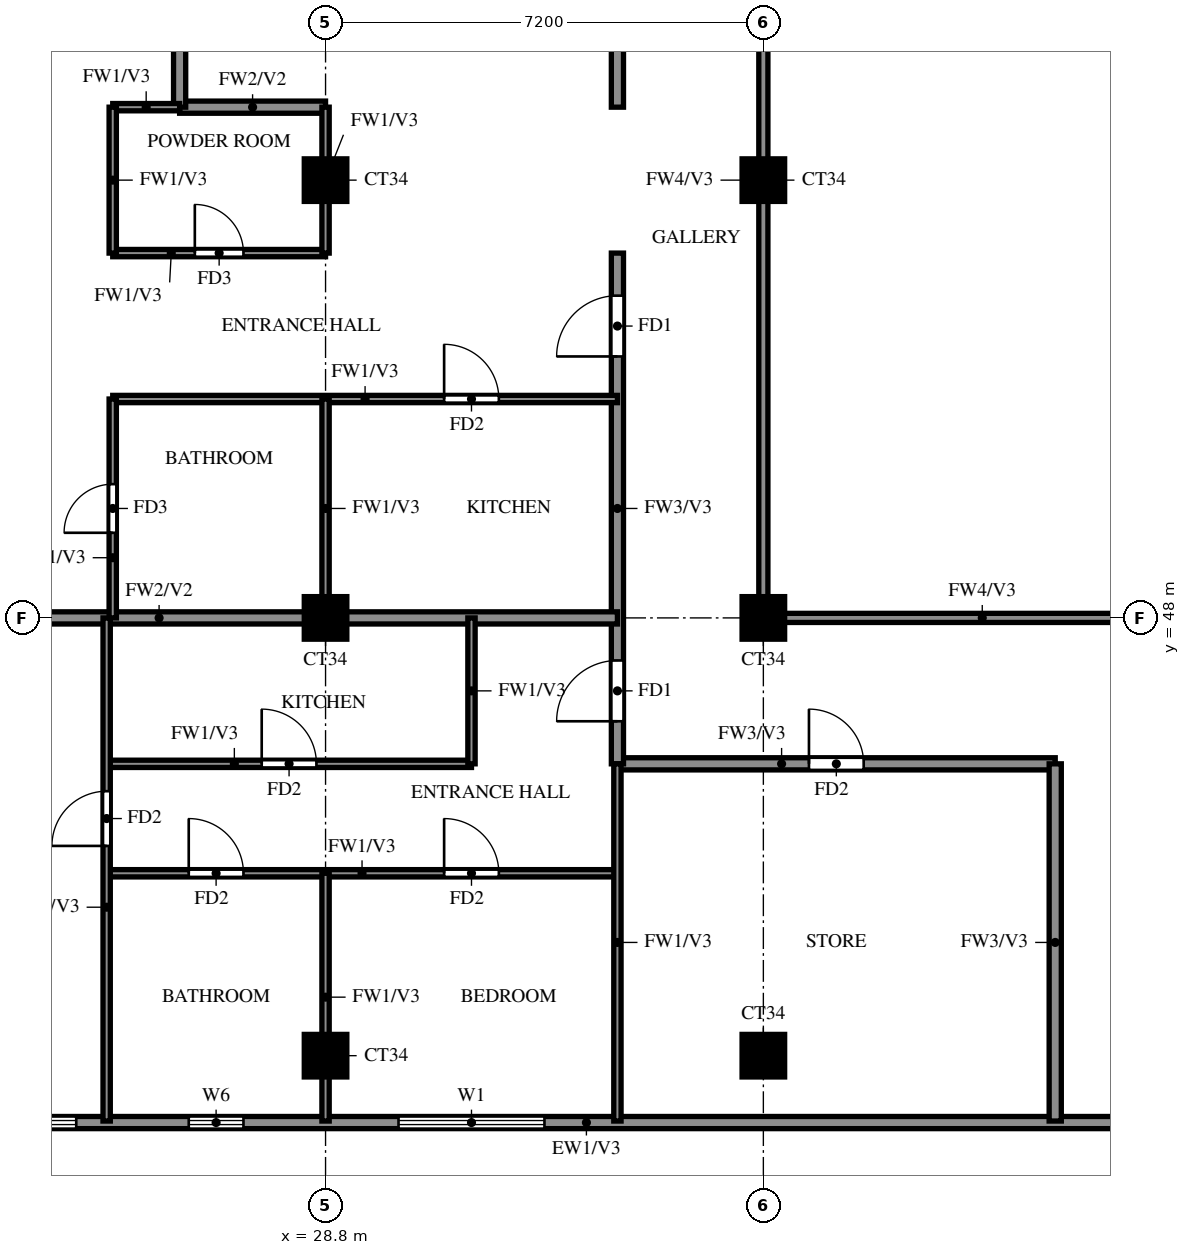
"""IFC4 building model, lengths in metres.
Left out: names, types, materials, properties, quantities, classifications, styles, units other than length and angle.
Written with IfcOpenShell. Run it as: python <this file> out.ifc"""

import sys

from ifc_helpers import new_model, si_unit, direction, frame, frame_2d, origin, origin_2d, place, context, subcontext, project, spatial, rectangle, extrude, source, transform, mapped, element, fill, save


model = new_model("IFC4")
c1 = context("Model", 3, precision=1e-05, world=origin(), true_north=direction((0.0, 1.0)))
c2 = subcontext(c1, "Body", "Model", "MODEL_VIEW")
j1 = project(units=[si_unit("LENGTHUNIT", "METRE"), si_unit("PLANEANGLEUNIT", "RADIAN")], contexts=[c1])
p1 = place(None, origin())
s1 = spatial("IfcSite", under=j1, at=p1, CompositionType="ELEMENT")
p2 = place(p1, origin())
s2 = spatial("IfcBuilding", under=s1, at=p2, CompositionType="ELEMENT")
p3 = place(p2, frame((0.0, 0.0, 260.5)))
s3 = spatial("IfcBuildingStorey", under=s2, at=p3, CompositionType="ELEMENT", Elevation=260.5)
m1 = source(origin(), c2, "Body", "SweptSolid", [
    extrude(rectangle(XDim=0.7, YDim=0.7, at=origin_2d()), origin(), (0.0, 0.0, 1.0), 3.22),
])
for number, where, z_axis, x_axis in (
    (1, (28.8, 40.8, 0.0), (0.0, 0.0, 1.0), (1.0, 0.0, 0.0)),
    (2, (36.0, 40.8, 0.0), (0.0, 0.0, 1.0), (1.0, 0.0, 0.0)),
    (3, (28.8, 48.0, 0.0), (0.0, 0.0, 1.0), (1.0, 0.0, 0.0)),
    (4, (36.0, 48.0, 0.0), (0.0, 0.0, 1.0), (1.0, 0.0, 0.0)),
    (5, (28.8, 55.2, 0.0), (0.0, 0.0, 1.0), (1.0, 0.0, 0.0)),
    (6, (36.0, 55.2, 0.0), (0.0, 0.0, 1.0), (1.0, 0.0, 0.0)),
):
    element("IfcColumn", number, at=place(p3, frame(where, z_axis=z_axis, x_axis=x_axis)), inside=s3, PredefinedType="COLUMN", context=c2, shape_type="MappedRepresentation", body=[
        mapped(m1, transform((0.0, 0.0, 0.0))),
    ])
p4 = place(p3, frame((22.2, 39.7, 0.0), z_axis=(0.0, 0.0, 1.0), x_axis=(1.0, 0.0, 0.0)))
e7 = element("IfcWall", 7, at=p4, inside=s3, PredefinedType="SOLIDWALL", context=c2, shape_type="SweptSolid", body=[
    extrude(rectangle(XDim=19.8, YDim=0.2, at=frame_2d((9.9, 0.0))), origin(), (0.0, 0.0, 1.0), 3.22),
])
p5 = place(p4, frame((0.7, 0.0, 0.6)))
e8 = element("IfcOpeningElement", 8, at=p5, cuts=e7, PredefinedType="OPENING", context=c2, shape_type="SweptSolid", body=[
    extrude(rectangle(XDim=1.8, YDim=2.4, at=frame_2d((0.9, 1.2))), frame((0.0, 0.11, 0.0), z_axis=(0.0, -1.0, 0.0), x_axis=(1.0, 0.0, 0.0)), (0.0, 0.0, 1.0), 0.22),
])
p6 = place(p4, frame((4.35, 0.0, 1.5)))
e9 = element("IfcOpeningElement", 9, at=p6, cuts=e7, PredefinedType="OPENING", context=c2, shape_type="SweptSolid", body=[
    extrude(rectangle(XDim=0.9, YDim=0.9, at=frame_2d((0.45, 0.45))), frame((0.0, 0.11, 0.0), z_axis=(0.0, -1.0, 0.0), x_axis=(1.0, 0.0, 0.0)), (0.0, 0.0, 1.0), 0.22),
])
p7 = place(p4, frame((7.8, 0.0, 0.6)))
e10 = element("IfcOpeningElement", 10, at=p7, cuts=e7, PredefinedType="OPENING", context=c2, shape_type="SweptSolid", body=[
    extrude(rectangle(XDim=2.4, YDim=2.4, at=frame_2d((1.2, 1.2))), frame((0.0, 0.11, 0.0), z_axis=(0.0, -1.0, 0.0), x_axis=(1.0, 0.0, 0.0)), (0.0, 0.0, 1.0), 0.22),
])
p8 = place(p3, frame((33.6, 45.6, 0.0), z_axis=(0.0, 0.0, 1.0), x_axis=(1.0, 0.0, 0.0)))
e11 = element("IfcWall", 11, at=p8, inside=s3, PredefinedType="SOLIDWALL", context=c2, shape_type="SweptSolid", body=[
    extrude(rectangle(XDim=7.2, YDim=0.2, at=frame_2d((3.6, 0.0))), origin(), (0.0, 0.0, 1.0), 3.22),
])
p9 = place(p8, frame((3.15, 0.0, 0.0)))
e12 = element("IfcOpeningElement", 12, at=p9, cuts=e11, PredefinedType="OPENING", context=c2, shape_type="SweptSolid", body=[
    extrude(rectangle(XDim=0.9, YDim=2.1, at=frame_2d((0.45, 1.05))), frame((0.0, 0.11, 0.0), z_axis=(0.0, -1.0, 0.0), x_axis=(1.0, 0.0, 0.0)), (0.0, 0.0, 1.0), 0.22),
])
p10 = place(p3, frame((33.6, 45.6, 0.0), z_axis=(0.0, 0.0, 1.0), x_axis=(0.0, 1.0, 0.0)))
e13 = element("IfcWall", 13, at=p10, inside=s3, PredefinedType="SOLIDWALL", context=c2, shape_type="SweptSolid", body=[
    extrude(rectangle(XDim=8.4, YDim=0.2, at=frame_2d((4.2, 0.0))), origin(), (0.0, 0.0, 1.0), 3.22),
])
p11 = place(p10, frame((0.7, 0.0, 0.0)))
e14 = element("IfcOpeningElement", 14, at=p11, cuts=e13, PredefinedType="OPENING", context=c2, shape_type="SweptSolid", body=[
    extrude(rectangle(XDim=1.0, YDim=2.1, at=frame_2d((0.5, 1.05))), frame((0.0, 0.11, 0.0), z_axis=(0.0, -1.0, 0.0), x_axis=(1.0, 0.0, 0.0)), (0.0, 0.0, 1.0), 0.22),
])
p12 = place(p10, frame((6.7, 0.0, 0.0)))
e15 = element("IfcOpeningElement", 15, at=p12, cuts=e13, PredefinedType="OPENING", context=c2, shape_type="SweptSolid", body=[
    extrude(rectangle(XDim=1.0, YDim=2.1, at=frame_2d((0.5, 1.05))), frame((0.0, 0.11, 0.0), z_axis=(0.0, -1.0, 0.0), x_axis=(1.0, 0.0, 0.0)), (0.0, 0.0, 1.0), 0.22),
])
p13 = place(p3, frame((33.6, 56.4, 0.0), z_axis=(0.0, 0.0, 1.0), x_axis=(0.0, 1.0, 0.0)))
e16 = element("IfcWall", 16, at=p13, inside=s3, PredefinedType="SOLIDWALL", context=c2, shape_type="SweptSolid", body=[
    extrude(rectangle(XDim=6.0, YDim=0.2, at=frame_2d((3.0, 0.0))), origin(), (0.0, 0.0, 1.0), 3.22),
])
p14 = place(p13, frame((3.7, 0.0, 0.0)))
e17 = element("IfcOpeningElement", 17, at=p14, cuts=e16, PredefinedType="OPENING", context=c2, shape_type="SweptSolid", body=[
    extrude(rectangle(XDim=1.0, YDim=2.1, at=frame_2d((0.5, 1.05))), frame((0.0, 0.11, 0.0), z_axis=(0.0, -1.0, 0.0), x_axis=(1.0, 0.0, 0.0)), (0.0, 0.0, 1.0), 0.22),
])
p15 = place(p3, frame((40.8, 39.725, 0.0), z_axis=(0.0, 0.0, 1.0), x_axis=(0.0, 1.0, 0.0)))
e18 = element("IfcWall", 18, at=p15, inside=s3, PredefinedType="SOLIDWALL", context=c2, shape_type="SweptSolid", body=[
    extrude(rectangle(XDim=5.875, YDim=0.2, at=frame_2d((2.938, 0.0))), origin(), (0.0, 0.0, 1.0), 3.22),
])
p16 = place(p3, frame((18.525, 48.0, 0.0), z_axis=(0.0, 0.0, 1.0), x_axis=(1.0, 0.0, 0.0)))
e19 = element("IfcWall", 19, at=p16, inside=s3, PredefinedType="SOLIDWALL", context=c2, shape_type="SweptSolid", body=[
    extrude(rectangle(XDim=15.075, YDim=0.2, at=frame_2d((7.538, 0.0))), origin(), (0.0, 0.0, 1.0), 3.22),
])
for number, where, z_axis, x_axis in (
    (20, (26.4, 56.4, 0.0), (0.0, 0.0, 1.0), (1.0, 0.0, 0.0)),
    (21, (26.4, 56.4, 0.0), (0.0, 0.0, 1.0), (0.0, 1.0, 0.0)),
):
    element("IfcWall", number, at=place(p3, frame(where, z_axis=z_axis, x_axis=x_axis)), inside=s3, PredefinedType="SOLIDWALL", context=c2, shape_type="SweptSolid", body=[
        extrude(rectangle(XDim=2.4, YDim=0.2, at=frame_2d((1.2, 0.0))), origin(), (0.0, 0.0, 1.0), 3.22),
    ])
p17 = place(p3, frame((25.2, 43.8, 0.0), z_axis=(0.0, 0.0, 1.0), x_axis=(1.0, 0.0, 0.0)))
e22 = element("IfcWall", 22, at=p17, inside=s3, PredefinedType="PARTITIONING", context=c2, shape_type="SweptSolid", body=[
    extrude(rectangle(XDim=8.4, YDim=0.12, at=frame_2d((4.2, 0.0))), origin(), (0.0, 0.0, 1.0), 3.22),
])
p18 = place(p17, frame((1.35, 0.0, 0.0)))
e23 = element("IfcOpeningElement", 23, at=p18, cuts=e22, PredefinedType="OPENING", context=c2, shape_type="SweptSolid", body=[
    extrude(rectangle(XDim=0.9, YDim=2.1, at=frame_2d((0.45, 1.05))), frame((0.0, 0.07, 0.0), z_axis=(0.0, -1.0, 0.0), x_axis=(1.0, 0.0, 0.0)), (0.0, 0.0, 1.0), 0.14),
])
p19 = place(p17, frame((5.55, 0.0, 0.0)))
e24 = element("IfcOpeningElement", 24, at=p19, cuts=e22, PredefinedType="OPENING", context=c2, shape_type="SweptSolid", body=[
    extrude(rectangle(XDim=0.9, YDim=2.1, at=frame_2d((0.45, 1.05))), frame((0.0, 0.07, 0.0), z_axis=(0.0, -1.0, 0.0), x_axis=(1.0, 0.0, 0.0)), (0.0, 0.0, 1.0), 0.14),
])
p20 = place(p3, frame((25.2, 45.6, 0.0), z_axis=(0.0, 0.0, 1.0), x_axis=(1.0, 0.0, 0.0)))
e25 = element("IfcWall", 25, at=p20, inside=s3, PredefinedType="PARTITIONING", context=c2, shape_type="SweptSolid", body=[
    extrude(rectangle(XDim=6.0, YDim=0.12, at=frame_2d((3.0, 0.0))), origin(), (0.0, 0.0, 1.0), 3.22),
])
p21 = place(p20, frame((2.55, 0.0, 0.0)))
e26 = element("IfcOpeningElement", 26, at=p21, cuts=e25, PredefinedType="OPENING", context=c2, shape_type="SweptSolid", body=[
    extrude(rectangle(XDim=0.9, YDim=2.1, at=frame_2d((0.45, 1.05))), frame((0.0, 0.07, 0.0), z_axis=(0.0, -1.0, 0.0), x_axis=(1.0, 0.0, 0.0)), (0.0, 0.0, 1.0), 0.14),
])
p22 = place(p3, frame((25.3, 51.6, 0.0), z_axis=(0.0, 0.0, 1.0), x_axis=(1.0, 0.0, 0.0)))
e27 = element("IfcWall", 27, at=p22, inside=s3, PredefinedType="PARTITIONING", context=c2, shape_type="SweptSolid", body=[
    extrude(rectangle(XDim=8.3, YDim=0.12, at=frame_2d((4.15, 0.0))), origin(), (0.0, 0.0, 1.0), 3.22),
])
p23 = place(p22, frame((5.45, 0.0, 0.0)))
e28 = element("IfcOpeningElement", 28, at=p23, cuts=e27, PredefinedType="OPENING", context=c2, shape_type="SweptSolid", body=[
    extrude(rectangle(XDim=0.9, YDim=2.1, at=frame_2d((0.45, 1.05))), frame((0.0, 0.07, 0.0), z_axis=(0.0, -1.0, 0.0), x_axis=(1.0, 0.0, 0.0)), (0.0, 0.0, 1.0), 0.14),
])
p24 = place(p3, frame((25.3, 54.0, 0.0), z_axis=(0.0, 0.0, 1.0), x_axis=(1.0, 0.0, 0.0)))
e29 = element("IfcWall", 29, at=p24, inside=s3, PredefinedType="PARTITIONING", context=c2, shape_type="SweptSolid", body=[
    extrude(rectangle(XDim=3.5, YDim=0.12, at=frame_2d((1.75, 0.0))), origin(), (0.0, 0.0, 1.0), 3.22),
])
p25 = place(p24, frame((1.35, 0.0, 0.0)))
e30 = element("IfcOpeningElement", 30, at=p25, cuts=e29, PredefinedType="OPENING", context=c2, shape_type="SweptSolid", body=[
    extrude(rectangle(XDim=0.8, YDim=2.1, at=frame_2d((0.4, 1.05))), frame((0.0, 0.07, 0.0), z_axis=(0.0, -1.0, 0.0), x_axis=(1.0, 0.0, 0.0)), (0.0, 0.0, 1.0), 0.14),
])
p26 = place(p3, frame((25.3, 56.4, 0.0), z_axis=(0.0, 0.0, 1.0), x_axis=(1.0, 0.0, 0.0)))
e31 = element("IfcWall", 31, at=p26, inside=s3, PredefinedType="PARTITIONING", context=c2, shape_type="SweptSolid", body=[
    extrude(rectangle(XDim=1.1, YDim=0.12, at=frame_2d((0.55, 0.0))), origin(), (0.0, 0.0, 1.0), 3.22),
])
p27 = place(p3, frame((25.2, 39.725, 0.0), z_axis=(0.0, 0.0, 1.0), x_axis=(0.0, 1.0, 0.0)))
e32 = element("IfcWall", 32, at=p27, inside=s3, PredefinedType="PARTITIONING", context=c2, shape_type="SweptSolid", body=[
    extrude(rectangle(XDim=8.275, YDim=0.12, at=frame_2d((4.137, 0.0))), origin(), (0.0, 0.0, 1.0), 3.22),
])
p28 = place(p27, frame((4.525, 0.0, 0.0)))
e33 = element("IfcOpeningElement", 33, at=p28, cuts=e32, PredefinedType="OPENING", context=c2, shape_type="SweptSolid", body=[
    extrude(rectangle(XDim=0.9, YDim=2.1, at=frame_2d((0.45, 1.05))), frame((0.0, 0.07, 0.0), z_axis=(0.0, -1.0, 0.0), x_axis=(1.0, 0.0, 0.0)), (0.0, 0.0, 1.0), 0.14),
])
p29 = place(p3, frame((25.3, 48.0, 0.0), z_axis=(0.0, 0.0, 1.0), x_axis=(0.0, 1.0, 0.0)))
e34 = element("IfcWall", 34, at=p29, inside=s3, PredefinedType="PARTITIONING", context=c2, shape_type="SweptSolid", body=[
    extrude(rectangle(XDim=3.6, YDim=0.12, at=frame_2d((1.8, 0.0))), origin(), (0.0, 0.0, 1.0), 3.22),
])
p30 = place(p29, frame((1.4, 0.0, 0.0)))
e35 = element("IfcOpeningElement", 35, at=p30, cuts=e34, PredefinedType="OPENING", context=c2, shape_type="SweptSolid", body=[
    extrude(rectangle(XDim=0.8, YDim=2.1, at=frame_2d((0.4, 1.05))), frame((0.0, 0.07, 0.0), z_axis=(0.0, -1.0, 0.0), x_axis=(1.0, 0.0, 0.0)), (0.0, 0.0, 1.0), 0.14),
])
p31 = place(p3, frame((25.3, 54.0, 0.0), z_axis=(0.0, 0.0, 1.0), x_axis=(0.0, 1.0, 0.0)))
e36 = element("IfcWall", 36, at=p31, inside=s3, PredefinedType="PARTITIONING", context=c2, shape_type="SweptSolid", body=[
    extrude(rectangle(XDim=2.4, YDim=0.12, at=frame_2d((1.2, 0.0))), origin(), (0.0, 0.0, 1.0), 3.22),
])
p32 = place(p3, frame((28.8, 39.725, 0.0), z_axis=(0.0, 0.0, 1.0), x_axis=(0.0, 1.0, 0.0)))
e37 = element("IfcWall", 37, at=p32, inside=s3, PredefinedType="PARTITIONING", context=c2, shape_type="SweptSolid", body=[
    extrude(rectangle(XDim=4.075, YDim=0.12, at=frame_2d((2.038, 0.0))), origin(), (0.0, 0.0, 1.0), 3.22),
])
p33 = place(p3, frame((28.8, 48.0, 0.0), z_axis=(0.0, 0.0, 1.0), x_axis=(0.0, 1.0, 0.0)))
e38 = element("IfcWall", 38, at=p33, inside=s3, PredefinedType="PARTITIONING", context=c2, shape_type="SweptSolid", body=[
    extrude(rectangle(XDim=3.6, YDim=0.12, at=frame_2d((1.8, 0.0))), origin(), (0.0, 0.0, 1.0), 3.22),
])
for number, where, z_axis, x_axis in (
    (39, (28.8, 54.0, 0.0), (0.0, 0.0, 1.0), (0.0, 1.0, 0.0)),
    (40, (31.2, 45.6, 0.0), (0.0, 0.0, 1.0), (0.0, 1.0, 0.0)),
):
    element("IfcWall", number, at=place(p3, frame(where, z_axis=z_axis, x_axis=x_axis)), inside=s3, PredefinedType="PARTITIONING", context=c2, shape_type="SweptSolid", body=[
        extrude(rectangle(XDim=2.4, YDim=0.12, at=frame_2d((1.2, 0.0))), origin(), (0.0, 0.0, 1.0), 3.22),
    ])
p34 = place(p3, frame((33.6, 39.725, 0.0), z_axis=(0.0, 0.0, 1.0), x_axis=(0.0, 1.0, 0.0)))
e41 = element("IfcWall", 41, at=p34, inside=s3, PredefinedType="PARTITIONING", context=c2, shape_type="SweptSolid", body=[
    extrude(rectangle(XDim=5.875, YDim=0.12, at=frame_2d((2.938, 0.0))), origin(), (0.0, 0.0, 1.0), 3.22),
])
p35 = place(p3, frame((36.0, 48.0, 0.0), z_axis=(0.0, 0.0, 1.0), x_axis=(1.0, 0.0, 0.0)))
e42 = element("IfcWall", 42, at=p35, inside=s3, PredefinedType="SOLIDWALL", context=c2, shape_type="SweptSolid", body=[
    extrude(rectangle(XDim=7.2, YDim=0.15, at=frame_2d((3.6, 0.0))), origin(), (0.0, 0.0, 1.0), 2.32),
])
p36 = place(p3, frame((36.0, 48.0, 0.0), z_axis=(0.0, 0.0, 1.0), x_axis=(0.0, 1.0, 0.0)))
e43 = element("IfcWall", 43, at=p36, inside=s3, PredefinedType="SOLIDWALL", context=c2, shape_type="SweptSolid", body=[
    extrude(rectangle(XDim=14.4, YDim=0.15, at=frame_2d((7.2, 0.0))), origin(), (0.0, 0.0, 1.0), 2.32),
])
p37 = place(p5, origin())
e44 = element("IfcWindow", 44, at=p37, inside=s3, PartitioningType="DOUBLE_PANEL_VERTICAL", PredefinedType="WINDOW", context=c2, shape_type="SweptSolid", body=[
    extrude(rectangle(XDim=1.8, YDim=2.4, at=frame_2d((0.9, 1.2))), frame((0.0, 0.03, 0.0), z_axis=(0.0, -1.0, 0.0), x_axis=(1.0, 0.0, 0.0)), (0.0, 0.0, 1.0), 0.06),
])
fill(e8, e44)
p38 = place(p6, origin())
e45 = element("IfcWindow", 45, at=p38, inside=s3, PartitioningType="SINGLE_PANEL", PredefinedType="WINDOW", context=c2, shape_type="SweptSolid", body=[
    extrude(rectangle(XDim=0.9, YDim=0.9, at=frame_2d((0.45, 0.45))), frame((0.0, 0.03, 0.0), z_axis=(0.0, -1.0, 0.0), x_axis=(1.0, 0.0, 0.0)), (0.0, 0.0, 1.0), 0.06),
])
fill(e9, e45)
p39 = place(p7, origin())
e46 = element("IfcWindow", 46, at=p39, inside=s3, PartitioningType="DOUBLE_PANEL_VERTICAL", PredefinedType="WINDOW", context=c2, shape_type="SweptSolid", body=[
    extrude(rectangle(XDim=2.4, YDim=2.4, at=frame_2d((1.2, 1.2))), frame((0.0, 0.03, 0.0), z_axis=(0.0, -1.0, 0.0), x_axis=(1.0, 0.0, 0.0)), (0.0, 0.0, 1.0), 0.06),
])
fill(e10, e46)
p40 = place(p11, origin())
e47 = element("IfcDoor", 47, at=p40, inside=s3, OperationType="SINGLE_SWING_LEFT", PredefinedType="DOOR", context=c2, shape_type="SweptSolid", body=[
    extrude(rectangle(XDim=1.0, YDim=2.1, at=frame_2d((0.5, 1.05))), frame((0.0, 0.025, 0.0), z_axis=(0.0, -1.0, 0.0), x_axis=(1.0, 0.0, 0.0)), (0.0, 0.0, 1.0), 0.05),
])
fill(e14, e47)
p41 = place(p28, origin())
e48 = element("IfcDoor", 48, at=p41, inside=s3, OperationType="SINGLE_SWING_LEFT", PredefinedType="DOOR", context=c2, shape_type="SweptSolid", body=[
    extrude(rectangle(XDim=0.9, YDim=2.1, at=frame_2d((0.45, 1.05))), frame((0.0, 0.025, 0.0), z_axis=(0.0, -1.0, 0.0), x_axis=(1.0, 0.0, 0.0)), (0.0, 0.0, 1.0), 0.05),
])
fill(e33, e48)
p42 = place(p18, origin())
e49 = element("IfcDoor", 49, at=p42, inside=s3, OperationType="SINGLE_SWING_RIGHT", PredefinedType="DOOR", context=c2, shape_type="SweptSolid", body=[
    extrude(rectangle(XDim=0.9, YDim=2.1, at=frame_2d((0.45, 1.05))), frame((0.0, 0.025, 0.0), z_axis=(0.0, -1.0, 0.0), x_axis=(1.0, 0.0, 0.0)), (0.0, 0.0, 1.0), 0.05),
])
fill(e23, e49)
p43 = place(p19, origin())
e50 = element("IfcDoor", 50, at=p43, inside=s3, OperationType="SINGLE_SWING_LEFT", PredefinedType="DOOR", context=c2, shape_type="SweptSolid", body=[
    extrude(rectangle(XDim=0.9, YDim=2.1, at=frame_2d((0.45, 1.05))), frame((0.0, 0.025, 0.0), z_axis=(0.0, -1.0, 0.0), x_axis=(1.0, 0.0, 0.0)), (0.0, 0.0, 1.0), 0.05),
])
fill(e24, e50)
p44 = place(p21, origin())
e51 = element("IfcDoor", 51, at=p44, inside=s3, OperationType="SINGLE_SWING_LEFT", PredefinedType="DOOR", context=c2, shape_type="SweptSolid", body=[
    extrude(rectangle(XDim=0.9, YDim=2.1, at=frame_2d((0.45, 1.05))), frame((0.0, 0.025, 0.0), z_axis=(0.0, -1.0, 0.0), x_axis=(1.0, 0.0, 0.0)), (0.0, 0.0, 1.0), 0.05),
])
fill(e26, e51)
p45 = place(p9, origin())
e52 = element("IfcDoor", 52, at=p45, inside=s3, OperationType="SINGLE_SWING_RIGHT", PredefinedType="DOOR", context=c2, shape_type="SweptSolid", body=[
    extrude(rectangle(XDim=0.9, YDim=2.1, at=frame_2d((0.45, 1.05))), frame((0.0, 0.025, 0.0), z_axis=(0.0, -1.0, 0.0), x_axis=(1.0, 0.0, 0.0)), (0.0, 0.0, 1.0), 0.05),
])
fill(e12, e52)
p46 = place(p12, origin())
e53 = element("IfcDoor", 53, at=p46, inside=s3, OperationType="SINGLE_SWING_LEFT", PredefinedType="DOOR", context=c2, shape_type="SweptSolid", body=[
    extrude(rectangle(XDim=1.0, YDim=2.1, at=frame_2d((0.5, 1.05))), frame((0.0, 0.025, 0.0), z_axis=(0.0, -1.0, 0.0), x_axis=(1.0, 0.0, 0.0)), (0.0, 0.0, 1.0), 0.05),
])
fill(e15, e53)
p47 = place(p30, origin())
e54 = element("IfcDoor", 54, at=p47, inside=s3, OperationType="SINGLE_SWING_LEFT", PredefinedType="DOOR", context=c2, shape_type="SweptSolid", body=[
    extrude(rectangle(XDim=0.8, YDim=2.1, at=frame_2d((0.4, 1.05))), frame((0.0, 0.025, 0.0), z_axis=(0.0, -1.0, 0.0), x_axis=(1.0, 0.0, 0.0)), (0.0, 0.0, 1.0), 0.05),
])
fill(e35, e54)
p48 = place(p25, origin())
e55 = element("IfcDoor", 55, at=p48, inside=s3, OperationType="SINGLE_SWING_LEFT", PredefinedType="DOOR", context=c2, shape_type="SweptSolid", body=[
    extrude(rectangle(XDim=0.8, YDim=2.1, at=frame_2d((0.4, 1.05))), frame((0.0, 0.025, 0.0), z_axis=(0.0, -1.0, 0.0), x_axis=(1.0, 0.0, 0.0)), (0.0, 0.0, 1.0), 0.05),
])
fill(e30, e55)
p49 = place(p23, origin())
e56 = element("IfcDoor", 56, at=p49, inside=s3, OperationType="SINGLE_SWING_RIGHT", PredefinedType="DOOR", context=c2, shape_type="SweptSolid", body=[
    extrude(rectangle(XDim=0.9, YDim=2.1, at=frame_2d((0.45, 1.05))), frame((0.0, 0.025, 0.0), z_axis=(0.0, -1.0, 0.0), x_axis=(1.0, 0.0, 0.0)), (0.0, 0.0, 1.0), 0.05),
])
fill(e28, e56)
save(model, sys.argv[1])
